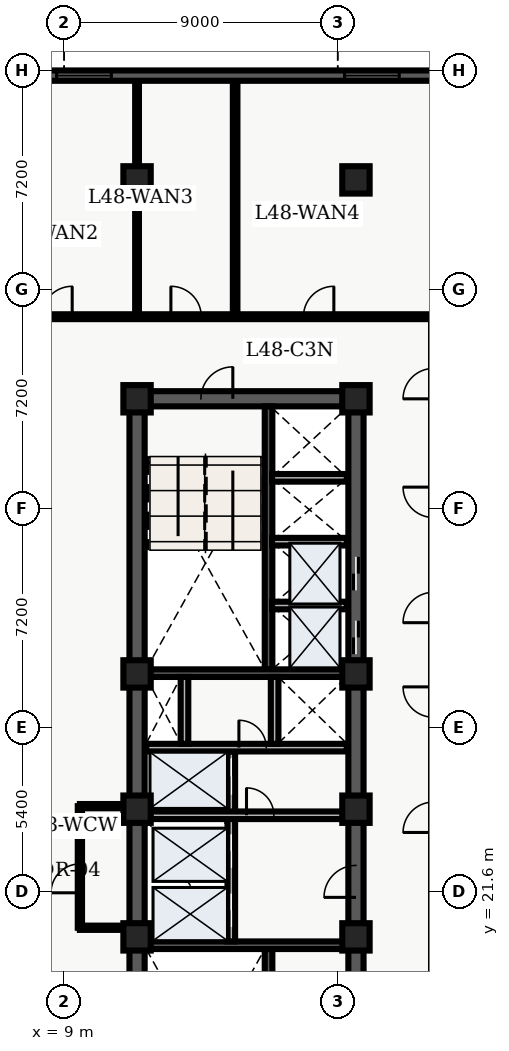
"""IFC4 building model, lengths in metres.
Left out: names, types, materials, properties, quantities, classifications, styles, units other than length and angle.
Written with IfcOpenShell. Run it as: python <this file> out.ifc"""

import sys

from ifc_helpers import new_model, entity, si_unit, converted_unit, direction, frame, origin_with_axes, origin_2d_with_axis, place, context, subcontext, project, spatial, polyline, rectangle, outline, extrude, element, fill, save


model = new_model("IFC4")
c1 = context("Model", 3, precision=1e-05, world=origin_with_axes(), true_north=direction((0.0, 1.0)))
c2 = subcontext(c1, "Body", "Model", "MODEL_VIEW")
j1 = project(units=[si_unit("LENGTHUNIT", "METRE"), converted_unit("PLANEANGLEUNIT", "DEGREE", entity("IfcPlaneAngleMeasure", 0.017), si_unit("PLANEANGLEUNIT", "RADIAN"), dimensions=[0, 0, 0, 0, 0, 0, 0])], contexts=[c1])
p1 = place(None, origin_with_axes())
s1 = spatial("IfcSite", under=j1, at=p1, CompositionType="ELEMENT")
p2 = place(p1, origin_with_axes())
s2 = spatial("IfcBuilding", under=s1, at=p2, CompositionType="ELEMENT")
p3 = place(p2, frame((0.0, 0.0, 196.5), z_axis=(0.0, 0.0, 1.0), x_axis=(1.0, 0.0, 0.0)))
s3 = spatial("IfcBuildingStorey", under=s2, at=p3, CompositionType="ELEMENT", Elevation=196.5)
p4 = place(p3, frame((11.4, 10.8, 0.0), z_axis=(0.0, 0.0, 1.0), x_axis=(0.0, 1.0, 0.0)))
e1 = element("IfcWall", 1, at=p4, inside=s3, PredefinedType="SHEAR", context=c2, shape_type="SweptSolid", body=[
    extrude(outline(polyline([(0.0, -0.25), (27.0, -0.25), (27.0, 0.25), (0.0, 0.25), (0.0, -0.25)])), origin_with_axes(), (0.0, 0.0, 1.0), 3.66),
])
p5 = place(p3, frame((11.4, 37.8, 0.0), z_axis=(0.0, 0.0, 1.0), x_axis=(1.0, 0.0, 0.0)))
e2 = element("IfcWall", 2, at=p5, inside=s3, PredefinedType="SHEAR", context=c2, shape_type="SweptSolid", body=[
    extrude(outline(polyline([(0.0, -0.25), (7.2, -0.25), (7.2, 0.25), (0.0, 0.25), (0.0, -0.25)])), origin_with_axes(), (0.0, 0.0, 1.0), 3.66),
])
p6 = place(p5, frame((2.625, 0.0, 0.0), z_axis=(0.0, 0.0, 1.0), x_axis=(1.0, 0.0, 0.0)))
e3 = element("IfcOpeningElement", 3, at=p6, cuts=e2, PredefinedType="OPENING", context=c2, shape_type="SweptSolid", body=[
    extrude(rectangle(XDim=1.05, YDim=0.52, at=origin_2d_with_axis()), origin_with_axes(), (0.0, 0.0, 1.0), 2.15),
])
p7 = place(p3, frame((18.6, 10.8, 0.0), z_axis=(0.0, 0.0, 1.0), x_axis=(0.0, 1.0, 0.0)))
e4 = element("IfcWall", 4, at=p7, inside=s3, PredefinedType="SHEAR", context=c2, shape_type="SweptSolid", body=[
    extrude(outline(polyline([(0.0, -0.25), (13.5, -0.25), (13.5, 0.25), (0.0, 0.25), (0.0, -0.25)])), origin_with_axes(), (0.0, 0.0, 1.0), 3.66),
])
p8 = place(p7, frame((11.125, 0.0, 0.0), z_axis=(0.0, 0.0, 1.0), x_axis=(1.0, 0.0, 0.0)))
e5 = element("IfcOpeningElement", 5, at=p8, cuts=e4, PredefinedType="OPENING", context=c2, shape_type="SweptSolid", body=[
    extrude(rectangle(XDim=1.05, YDim=0.52, at=origin_2d_with_axis()), origin_with_axes(), (0.0, 0.0, 1.0), 2.15),
])
p9 = place(p7, frame((4.325, 0.0, 0.0), z_axis=(0.0, 0.0, 1.0), x_axis=(1.0, 0.0, 0.0)))
e6 = element("IfcOpeningElement", 6, at=p9, cuts=e4, PredefinedType="OPENING", context=c2, shape_type="SweptSolid", body=[
    extrude(rectangle(XDim=1.05, YDim=0.52, at=origin_2d_with_axis()), origin_with_axes(), (0.0, 0.0, 1.0), 2.15),
])
p10 = place(p3, frame((18.6, 24.3, 0.0), z_axis=(0.0, 0.0, 1.0), x_axis=(0.0, 1.0, 0.0)))
e7 = element("IfcWall", 7, at=p10, inside=s3, PredefinedType="SHEAR", context=c2, shape_type="SweptSolid", body=[
    extrude(outline(polyline([(0.0, -0.25), (13.5, -0.25), (13.5, 0.25), (0.0, 0.25), (0.0, -0.25)])), origin_with_axes(), (0.0, 0.0, 1.0), 3.66),
])
p11 = place(p10, frame((5.65, 0.0, 0.0), z_axis=(0.0, 0.0, 1.0), x_axis=(1.0, 0.0, 0.0)))
e8 = element("IfcOpeningElement", 8, at=p11, cuts=e7, PredefinedType="OPENING", context=c2, shape_type="SweptSolid", body=[
    extrude(rectangle(XDim=1.1, YDim=0.52, at=origin_2d_with_axis()), origin_with_axes(), (0.0, 0.0, 1.0), 2.15),
])
p12 = place(p10, frame((7.75, 0.0, 0.0), z_axis=(0.0, 0.0, 1.0), x_axis=(1.0, 0.0, 0.0)))
e9 = element("IfcOpeningElement", 9, at=p12, cuts=e7, PredefinedType="OPENING", context=c2, shape_type="SweptSolid", body=[
    extrude(rectangle(XDim=1.1, YDim=0.52, at=origin_2d_with_axis()), origin_with_axes(), (0.0, 0.0, 1.0), 2.15),
])
p13 = place(p3, frame((15.725, 11.05, 0.0), z_axis=(0.0, 0.0, 1.0), x_axis=(0.0, 1.0, 0.0)))
e10 = element("IfcWall", 10, at=p13, inside=s3, PredefinedType="SHEAR", context=c2, shape_type="SweptSolid", body=[
    extrude(outline(polyline([(0.0, -0.125), (8.65, -0.125), (8.65, 0.125), (0.0, 0.125), (0.0, -0.125)])), origin_with_axes(), (0.0, 0.0, 1.0), 3.66),
])
p14 = place(p3, frame((11.65, 19.825, 0.0), z_axis=(0.0, 0.0, 1.0), x_axis=(1.0, 0.0, 0.0)))
e11 = element("IfcWall", 11, at=p14, inside=s3, PredefinedType="SHEAR", context=c2, shape_type="SweptSolid", body=[
    extrude(outline(polyline([(0.0, -0.125), (6.7, -0.125), (6.7, 0.125), (0.0, 0.125), (0.0, -0.125)])), origin_with_axes(), (0.0, 0.0, 1.0), 3.66),
])
p15 = place(p3, frame((15.725, 28.9, 0.0), z_axis=(0.0, 0.0, 1.0), x_axis=(0.0, 1.0, 0.0)))
e12 = element("IfcWall", 12, at=p15, inside=s3, PredefinedType="SHEAR", context=c2, shape_type="SweptSolid", body=[
    extrude(outline(polyline([(0.0, -0.125), (8.65, -0.125), (8.65, 0.125), (0.0, 0.125), (0.0, -0.125)])), origin_with_axes(), (0.0, 0.0, 1.0), 3.66),
])
p16 = place(p3, frame((11.65, 28.775, 0.0), z_axis=(0.0, 0.0, 1.0), x_axis=(1.0, 0.0, 0.0)))
e13 = element("IfcWall", 13, at=p16, inside=s3, PredefinedType="SHEAR", context=c2, shape_type="SweptSolid", body=[
    extrude(outline(polyline([(0.0, -0.125), (6.7, -0.125), (6.7, 0.125), (0.0, 0.125), (0.0, -0.125)])), origin_with_axes(), (0.0, 0.0, 1.0), 3.66),
])
p17 = place(p3, frame((14.5, 19.95, 0.0), z_axis=(0.0, 0.0, 1.0), x_axis=(0.0, 1.0, 0.0)))
e14 = element("IfcWall", 14, at=p17, inside=s3, PredefinedType="SOLIDWALL", context=c2, shape_type="SweptSolid", body=[
    extrude(outline(polyline([(0.0, -0.125), (6.25, -0.125), (6.25, 0.125), (0.0, 0.125), (0.0, -0.125)])), origin_with_axes(), (0.0, 0.0, 1.0), 2.7),
])
p18 = place(p17, frame((1.025, 0.0, 0.0), z_axis=(0.0, 0.0, 1.0), x_axis=(1.0, 0.0, 0.0)))
e15 = element("IfcOpeningElement", 15, at=p18, cuts=e14, PredefinedType="OPENING", context=c2, shape_type="SweptSolid", body=[
    extrude(rectangle(XDim=1.1, YDim=0.27, at=origin_2d_with_axis()), origin_with_axes(), (0.0, 0.0, 1.0), 2.15),
])
p19 = place(p17, frame((2.975, 0.0, 0.0), z_axis=(0.0, 0.0, 1.0), x_axis=(1.0, 0.0, 0.0)))
e16 = element("IfcOpeningElement", 16, at=p19, cuts=e14, PredefinedType="OPENING", context=c2, shape_type="SweptSolid", body=[
    extrude(rectangle(XDim=1.1, YDim=0.27, at=origin_2d_with_axis()), origin_with_axes(), (0.0, 0.0, 1.0), 2.15),
])
p20 = place(p17, frame((5.425, 0.0, 0.0), z_axis=(0.0, 0.0, 1.0), x_axis=(1.0, 0.0, 0.0)))
e17 = element("IfcOpeningElement", 17, at=p20, cuts=e14, PredefinedType="OPENING", context=c2, shape_type="SweptSolid", body=[
    extrude(rectangle(XDim=1.2, YDim=0.27, at=origin_2d_with_axis()), origin_with_axes(), (0.0, 0.0, 1.0), 2.15),
])
p21 = place(p3, frame((11.7, 24.1, 0.0), z_axis=(0.0, 0.0, 1.0), x_axis=(1.0, 0.0, 0.0)))
e18 = element("IfcWall", 18, at=p21, inside=s3, PredefinedType="SOLIDWALL", context=c2, shape_type="SweptSolid", body=[
    extrude(outline(polyline([(0.0, -0.125), (6.6, -0.125), (6.6, 0.125), (0.0, 0.125), (0.0, -0.125)])), origin_with_axes(), (0.0, 0.0, 1.0), 2.7),
])
p22 = place(p21, frame((3.75, 0.0, 0.0), z_axis=(0.0, 0.0, 1.0), x_axis=(1.0, 0.0, 0.0)))
e19 = element("IfcOpeningElement", 19, at=p22, cuts=e18, PredefinedType="OPENING", context=c2, shape_type="SweptSolid", body=[
    extrude(rectangle(XDim=0.9, YDim=0.27, at=origin_2d_with_axis()), origin_with_axes(), (0.0, 0.0, 1.0), 2.15),
])
p23 = place(p3, frame((11.7, 26.325, 0.0), z_axis=(0.0, 0.0, 1.0), x_axis=(1.0, 0.0, 0.0)))
e20 = element("IfcWall", 20, at=p23, inside=s3, PredefinedType="SOLIDWALL", context=c2, shape_type="SweptSolid", body=[
    extrude(outline(polyline([(0.0, -0.125), (6.6, -0.125), (6.6, 0.125), (0.0, 0.125), (0.0, -0.125)])), origin_with_axes(), (0.0, 0.0, 1.0), 2.7),
])
p24 = place(p23, frame((3.5, 0.0, 0.0), z_axis=(0.0, 0.0, 1.0), x_axis=(1.0, 0.0, 0.0)))
e21 = element("IfcOpeningElement", 21, at=p24, cuts=e20, PredefinedType="OPENING", context=c2, shape_type="SweptSolid", body=[
    extrude(rectangle(XDim=0.9, YDim=0.27, at=origin_2d_with_axis()), origin_with_axes(), (0.0, 0.0, 1.0), 2.15),
])
for number, where, z_axis, x_axis in (
    (22, (12.96, 26.45, 0.0), (0.0, 0.0, 1.0), (0.0, 1.0, 0.0)),
    (23, (15.925, 26.45, 0.0), (0.0, 0.0, 1.0), (0.0, 1.0, 0.0)),
):
    element("IfcWall", number, at=place(p3, frame(where, z_axis=z_axis, x_axis=x_axis)), inside=s3, PredefinedType="SOLIDWALL", context=c2, shape_type="SweptSolid", body=[
        extrude(outline(polyline([(0.0, -0.125), (2.2, -0.125), (2.2, 0.125), (0.0, 0.125), (0.0, -0.125)])), origin_with_axes(), (0.0, 0.0, 1.0), 2.7),
    ])
for number, where, z_axis, x_axis in (
    (24, (11.4, 20.1, 0.0), (0.0, 0.0, 1.0), (1.0, 0.0, 0.0)),
    (25, (11.4, 24.3, 0.0), (0.0, 0.0, 1.0), (1.0, 0.0, 0.0)),
    (26, (11.4, 28.75, 0.0), (0.0, 0.0, 1.0), (1.0, 0.0, 0.0)),
    (27, (11.4, 37.8, 0.0), (0.0, 0.0, 1.0), (1.0, 0.0, 0.0)),
    (28, (11.4, 45.0, 0.0), (0.0, 0.0, 1.0), (1.0, 0.0, 0.0)),
    (29, (18.6, 20.1, 0.0), (0.0, 0.0, 1.0), (1.0, 0.0, 0.0)),
    (30, (18.6, 24.3, 0.0), (0.0, 0.0, 1.0), (1.0, 0.0, 0.0)),
    (31, (18.6, 28.75, 0.0), (0.0, 0.0, 1.0), (1.0, 0.0, 0.0)),
    (32, (18.6, 37.8, 0.0), (0.0, 0.0, 1.0), (1.0, 0.0, 0.0)),
    (33, (18.6, 45.0, 0.0), (0.0, 0.0, 1.0), (1.0, 0.0, 0.0)),
):
    element("IfcColumn", number, at=place(p3, frame(where, z_axis=z_axis, x_axis=x_axis)), inside=s3, PredefinedType="COLUMN", context=c2, shape_type="SweptSolid", body=[
        extrude(rectangle(XDim=0.9, YDim=0.9, at=origin_2d_with_axis()), origin_with_axes(), (0.0, 0.0, 1.0), 3.9),
    ])
for number, where, z_axis, x_axis in (
    (34, (15.84, 31.0, 0.0), (0.0, 0.0, 1.0), (1.0, 0.0, 0.0)),
    (35, (15.84, 33.1, 0.0), (0.0, 0.0, 1.0), (1.0, 0.0, 0.0)),
    (36, (15.84, 35.2, 0.0), (0.0, 0.0, 1.0), (1.0, 0.0, 0.0)),
):
    element("IfcWall", number, at=place(p3, frame(where, z_axis=z_axis, x_axis=x_axis)), inside=s3, PredefinedType="SOLIDWALL", context=c2, shape_type="SweptSolid", body=[
        extrude(outline(polyline([(0.0, -0.125), (2.46, -0.125), (2.46, 0.125), (0.0, 0.125), (0.0, -0.125)])), origin_with_axes(), (0.0, 0.0, 1.0), 2.7),
    ])
p25 = place(p3, frame((9.52, 20.4, 0.0), z_axis=(0.0, 0.0, 1.0), x_axis=(0.0, 1.0, 0.0)))
e37 = element("IfcWall", 37, at=p25, inside=s3, PredefinedType="PARTITIONING", context=c2, shape_type="SweptSolid", body=[
    extrude(outline(polyline([(0.0, -0.07), (4.0, -0.07), (4.0, 0.07), (0.0, 0.07), (0.0, -0.07)])), origin_with_axes(), (0.0, 0.0, 1.0), 2.7),
])
p26 = place(p25, frame((1.625, 0.0, 0.0), z_axis=(0.0, 0.0, 1.0), x_axis=(1.0, 0.0, 0.0)))
e38 = element("IfcOpeningElement", 38, at=p26, cuts=e37, PredefinedType="OPENING", context=c2, shape_type="SweptSolid", body=[
    extrude(rectangle(XDim=0.95, YDim=0.16, at=origin_2d_with_axis()), origin_with_axes(), (0.0, 0.0, 1.0), 2.15),
])
for number, where, z_axis, x_axis in (
    (39, (9.52, 20.4, 0.0), (0.0, 0.0, 1.0), (1.0, 0.0, 0.0)),
    (40, (9.52, 24.4, 0.0), (0.0, 0.0, 1.0), (1.0, 0.0, 0.0)),
):
    element("IfcWall", number, at=place(p3, frame(where, z_axis=z_axis, x_axis=x_axis)), inside=s3, PredefinedType="PARTITIONING", context=c2, shape_type="SweptSolid", body=[
        extrude(outline(polyline([(0.0, -0.07), (1.58, -0.07), (1.58, 0.07), (0.0, 0.07), (0.0, -0.07)])), origin_with_axes(), (0.0, 0.0, 1.0), 2.7),
    ])
p27 = place(p3, frame((2.6, 40.5, 0.0), z_axis=(0.0, 0.0, 1.0), x_axis=(1.0, 0.0, 0.0)))
e41 = element("IfcWall", 41, at=p27, inside=s3, PredefinedType="PARTITIONING", context=c2, shape_type="SweptSolid", body=[
    extrude(outline(polyline([(0.0, -0.08), (25.444, -0.08), (25.444, 0.08), (0.0, 0.08), (0.0, -0.08)])), origin_with_axes(), (0.0, 0.0, 1.0), 2.7),
])
p28 = place(p27, frame((1.762, 0.0, 0.0), z_axis=(0.0, 0.0, 1.0), x_axis=(1.0, 0.0, 0.0)))
e42 = element("IfcOpeningElement", 42, at=p28, cuts=e41, PredefinedType="OPENING", context=c2, shape_type="SweptSolid", body=[
    extrude(rectangle(XDim=1.0, YDim=0.18, at=origin_2d_with_axis()), origin_with_axes(), (0.0, 0.0, 1.0), 2.15),
])
p29 = place(p27, frame((6.167, 0.0, 0.0), z_axis=(0.0, 0.0, 1.0), x_axis=(1.0, 0.0, 0.0)))
e43 = element("IfcOpeningElement", 43, at=p29, cuts=e41, PredefinedType="OPENING", context=c2, shape_type="SweptSolid", body=[
    extrude(rectangle(XDim=1.0, YDim=0.18, at=origin_2d_with_axis()), origin_with_axes(), (0.0, 0.0, 1.0), 2.15),
])
p30 = place(p27, frame((10.413, 0.0, 0.0), z_axis=(0.0, 0.0, 1.0), x_axis=(1.0, 0.0, 0.0)))
e44 = element("IfcOpeningElement", 44, at=p30, cuts=e41, PredefinedType="OPENING", context=c2, shape_type="SweptSolid", body=[
    extrude(rectangle(XDim=1.0, YDim=0.18, at=origin_2d_with_axis()), origin_with_axes(), (0.0, 0.0, 1.0), 2.15),
])
p31 = place(p27, frame((14.773, 0.0, 0.0), z_axis=(0.0, 0.0, 1.0), x_axis=(1.0, 0.0, 0.0)))
e45 = element("IfcOpeningElement", 45, at=p31, cuts=e41, PredefinedType="OPENING", context=c2, shape_type="SweptSolid", body=[
    extrude(rectangle(XDim=1.0, YDim=0.18, at=origin_2d_with_axis()), origin_with_axes(), (0.0, 0.0, 1.0), 2.15),
])
p32 = place(p3, frame((11.4, 40.6, 0.0), z_axis=(0.0, 0.0, 1.0), x_axis=(0.0, 1.0, 0.0)))
e46 = element("IfcWall", 46, at=p32, inside=s3, PredefinedType="PARTITIONING", context=c2, shape_type="SweptSolid", body=[
    extrude(outline(polyline([(0.0, -0.062), (7.665, -0.062), (7.665, 0.062), (0.0, 0.062), (0.0, -0.062)])), origin_with_axes(), (0.0, 0.0, 1.0), 2.7),
])
p33 = place(p3, frame((14.626, 40.6, 0.0), z_axis=(0.0, 0.0, 1.0), x_axis=(0.0, 1.0, 0.0)))
e47 = element("IfcWall", 47, at=p33, inside=s3, PredefinedType="PARTITIONING", context=c2, shape_type="SweptSolid", body=[
    extrude(outline(polyline([(0.0, -0.075), (7.665, -0.075), (7.665, 0.075), (0.0, 0.075), (0.0, -0.075)])), origin_with_axes(), (0.0, 0.0, 1.0), 2.7),
])
p34 = place(p3, frame((2.74, 48.43, 0.0), z_axis=(0.0, 0.0, 1.0), x_axis=(1.0, 0.0, 0.0)))
e48 = element("IfcWall", 48, at=p34, inside=s3, PredefinedType="SOLIDWALL", context=c2, shape_type="SweptSolid", body=[
    extrude(outline(polyline([(0.0, -0.17), (19.239, -0.17), (19.239, 0.17), (0.0, 0.17), (0.0, -0.17)])), origin_with_axes(), (0.0, 0.0, 1.0), 3.66),
])
p35 = place(p34, frame((6.915, 0.0, 0.45), z_axis=(0.0, 0.0, 1.0), x_axis=(1.0, 0.0, 0.0)))
e49 = element("IfcOpeningElement", 49, at=p35, cuts=e48, PredefinedType="OPENING", context=c2, shape_type="SweptSolid", body=[
    extrude(rectangle(XDim=1.8, YDim=0.36, at=origin_2d_with_axis()), origin_with_axes(), (0.0, 0.0, 1.0), 2.1),
])
p36 = place(p34, frame((16.384, 0.0, 0.45), z_axis=(0.0, 0.0, 1.0), x_axis=(1.0, 0.0, 0.0)))
e50 = element("IfcOpeningElement", 50, at=p36, cuts=e48, PredefinedType="OPENING", context=c2, shape_type="SweptSolid", body=[
    extrude(rectangle(XDim=1.8, YDim=0.36, at=origin_2d_with_axis()), origin_with_axes(), (0.0, 0.0, 1.0), 2.1),
])
p37 = place(p10, frame((5.65, 0.0, 0.0), z_axis=(0.0, 0.0, 1.0), x_axis=(1.0, 0.0, 0.0)))
e51 = element("IfcDoor", 51, at=p37, inside=s3, OperationType="SLIDING_TO_LEFT", PredefinedType="DOOR", context=c2, shape_type="SweptSolid", body=[
    extrude(rectangle(XDim=1.1, YDim=0.09, at=origin_2d_with_axis()), origin_with_axes(), (0.0, 0.0, 1.0), 2.15),
])
fill(e8, e51)
p38 = place(p10, frame((7.75, 0.0, 0.0), z_axis=(0.0, 0.0, 1.0), x_axis=(1.0, 0.0, 0.0)))
e52 = element("IfcDoor", 52, at=p38, inside=s3, OperationType="SLIDING_TO_RIGHT", PredefinedType="DOOR", context=c2, shape_type="SweptSolid", body=[
    extrude(rectangle(XDim=1.1, YDim=0.09, at=origin_2d_with_axis()), origin_with_axes(), (0.0, 0.0, 1.0), 2.15),
])
fill(e9, e52)
p39 = place(p17, frame((1.025, 0.0, 0.0), z_axis=(0.0, 0.0, 1.0), x_axis=(1.0, 0.0, 0.0)))
e53 = element("IfcDoor", 53, at=p39, inside=s3, OperationType="SLIDING_TO_LEFT", PredefinedType="DOOR", context=c2, shape_type="SweptSolid", body=[
    extrude(rectangle(XDim=1.1, YDim=0.09, at=origin_2d_with_axis()), origin_with_axes(), (0.0, 0.0, 1.0), 2.15),
])
fill(e15, e53)
p40 = place(p17, frame((2.975, 0.0, 0.0), z_axis=(0.0, 0.0, 1.0), x_axis=(1.0, 0.0, 0.0)))
e54 = element("IfcDoor", 54, at=p40, inside=s3, OperationType="SLIDING_TO_RIGHT", PredefinedType="DOOR", context=c2, shape_type="SweptSolid", body=[
    extrude(rectangle(XDim=1.1, YDim=0.09, at=origin_2d_with_axis()), origin_with_axes(), (0.0, 0.0, 1.0), 2.15),
])
fill(e16, e54)
p41 = place(p17, frame((5.425, 0.0, 0.0), z_axis=(0.0, 0.0, 1.0), x_axis=(1.0, 0.0, 0.0)))
e55 = element("IfcDoor", 55, at=p41, inside=s3, OperationType="DOUBLE_DOOR_SLIDING", PredefinedType="DOOR", context=c2, shape_type="SweptSolid", body=[
    extrude(rectangle(XDim=1.2, YDim=0.09, at=origin_2d_with_axis()), origin_with_axes(), (0.0, 0.0, 1.0), 2.15),
])
fill(e17, e55)
p42 = place(p5, frame((2.625, 0.0, 0.0), z_axis=(0.0, 0.0, 1.0), x_axis=(1.0, 0.0, 0.0)))
e56 = element("IfcDoor", 56, at=p42, inside=s3, OperationType="SINGLE_SWING_RIGHT", PredefinedType="DOOR", context=c2, shape_type="SweptSolid", body=[
    extrude(rectangle(XDim=1.05, YDim=0.09, at=origin_2d_with_axis()), origin_with_axes(), (0.0, 0.0, 1.0), 2.15),
])
fill(e3, e56)
p43 = place(p7, frame((11.125, 0.0, 0.0), z_axis=(0.0, 0.0, 1.0), x_axis=(1.0, 0.0, 0.0)))
e57 = element("IfcDoor", 57, at=p43, inside=s3, OperationType="SINGLE_SWING_LEFT", PredefinedType="DOOR", context=c2, shape_type="SweptSolid", body=[
    extrude(rectangle(XDim=1.05, YDim=0.09, at=origin_2d_with_axis()), origin_with_axes(), (0.0, 0.0, 1.0), 2.15),
])
fill(e5, e57)
p44 = place(p21, frame((3.75, 0.0, 0.0), z_axis=(0.0, 0.0, 1.0), x_axis=(1.0, 0.0, 0.0)))
e58 = element("IfcDoor", 58, at=p44, inside=s3, OperationType="SINGLE_SWING_LEFT", PredefinedType="DOOR", context=c2, shape_type="SweptSolid", body=[
    extrude(rectangle(XDim=0.9, YDim=0.09, at=origin_2d_with_axis()), origin_with_axes(), (0.0, 0.0, 1.0), 2.15),
])
fill(e19, e58)
p45 = place(p23, frame((3.5, 0.0, 0.0), z_axis=(0.0, 0.0, 1.0), x_axis=(1.0, 0.0, 0.0)))
e59 = element("IfcDoor", 59, at=p45, inside=s3, OperationType="SINGLE_SWING_LEFT", PredefinedType="DOOR", context=c2, shape_type="SweptSolid", body=[
    extrude(rectangle(XDim=0.9, YDim=0.09, at=origin_2d_with_axis()), origin_with_axes(), (0.0, 0.0, 1.0), 2.15),
])
fill(e21, e59)
p46 = place(p25, frame((1.625, 0.0, 0.0), z_axis=(0.0, 0.0, 1.0), x_axis=(1.0, 0.0, 0.0)))
e60 = element("IfcDoor", 60, at=p46, inside=s3, OperationType="SINGLE_SWING_LEFT", PredefinedType="DOOR", context=c2, shape_type="SweptSolid", body=[
    extrude(rectangle(XDim=0.95, YDim=0.084, at=origin_2d_with_axis()), origin_with_axes(), (0.0, 0.0, 1.0), 2.15),
])
fill(e38, e60)
p47 = place(p27, frame((6.167, 0.0, 0.0), z_axis=(0.0, 0.0, 1.0), x_axis=(1.0, 0.0, 0.0)))
e61 = element("IfcDoor", 61, at=p47, inside=s3, OperationType="SINGLE_SWING_RIGHT", PredefinedType="DOOR", context=c2, shape_type="SweptSolid", body=[
    extrude(rectangle(XDim=1.0, YDim=0.09, at=origin_2d_with_axis()), origin_with_axes(), (0.0, 0.0, 1.0), 2.15),
])
fill(e43, e61)
p48 = place(p27, frame((10.413, 0.0, 0.0), z_axis=(0.0, 0.0, 1.0), x_axis=(1.0, 0.0, 0.0)))
e62 = element("IfcDoor", 62, at=p48, inside=s3, OperationType="SINGLE_SWING_LEFT", PredefinedType="DOOR", context=c2, shape_type="SweptSolid", body=[
    extrude(rectangle(XDim=1.0, YDim=0.09, at=origin_2d_with_axis()), origin_with_axes(), (0.0, 0.0, 1.0), 2.15),
])
fill(e44, e62)
p49 = place(p27, frame((14.773, 0.0, 0.0), z_axis=(0.0, 0.0, 1.0), x_axis=(1.0, 0.0, 0.0)))
e63 = element("IfcDoor", 63, at=p49, inside=s3, OperationType="SINGLE_SWING_RIGHT", PredefinedType="DOOR", context=c2, shape_type="SweptSolid", body=[
    extrude(rectangle(XDim=1.0, YDim=0.09, at=origin_2d_with_axis()), origin_with_axes(), (0.0, 0.0, 1.0), 2.15),
])
fill(e45, e63)
p50 = place(p34, frame((6.915, 0.0, 0.45), z_axis=(0.0, 0.0, 1.0), x_axis=(1.0, 0.0, 0.0)))
e64 = element("IfcWindow", 64, at=p50, inside=s3, PredefinedType="WINDOW", context=c2, shape_type="SweptSolid", body=[
    extrude(rectangle(XDim=1.8, YDim=0.09, at=origin_2d_with_axis()), origin_with_axes(), (0.0, 0.0, 1.0), 2.1),
])
fill(e49, e64)
p51 = place(p34, frame((16.384, 0.0, 0.45), z_axis=(0.0, 0.0, 1.0), x_axis=(1.0, 0.0, 0.0)))
e65 = element("IfcWindow", 65, at=p51, inside=s3, PredefinedType="WINDOW", context=c2, shape_type="SweptSolid", body=[
    extrude(rectangle(XDim=1.8, YDim=0.09, at=origin_2d_with_axis()), origin_with_axes(), (0.0, 0.0, 1.0), 2.1),
])
fill(e50, e65)
save(model, sys.argv[1])
